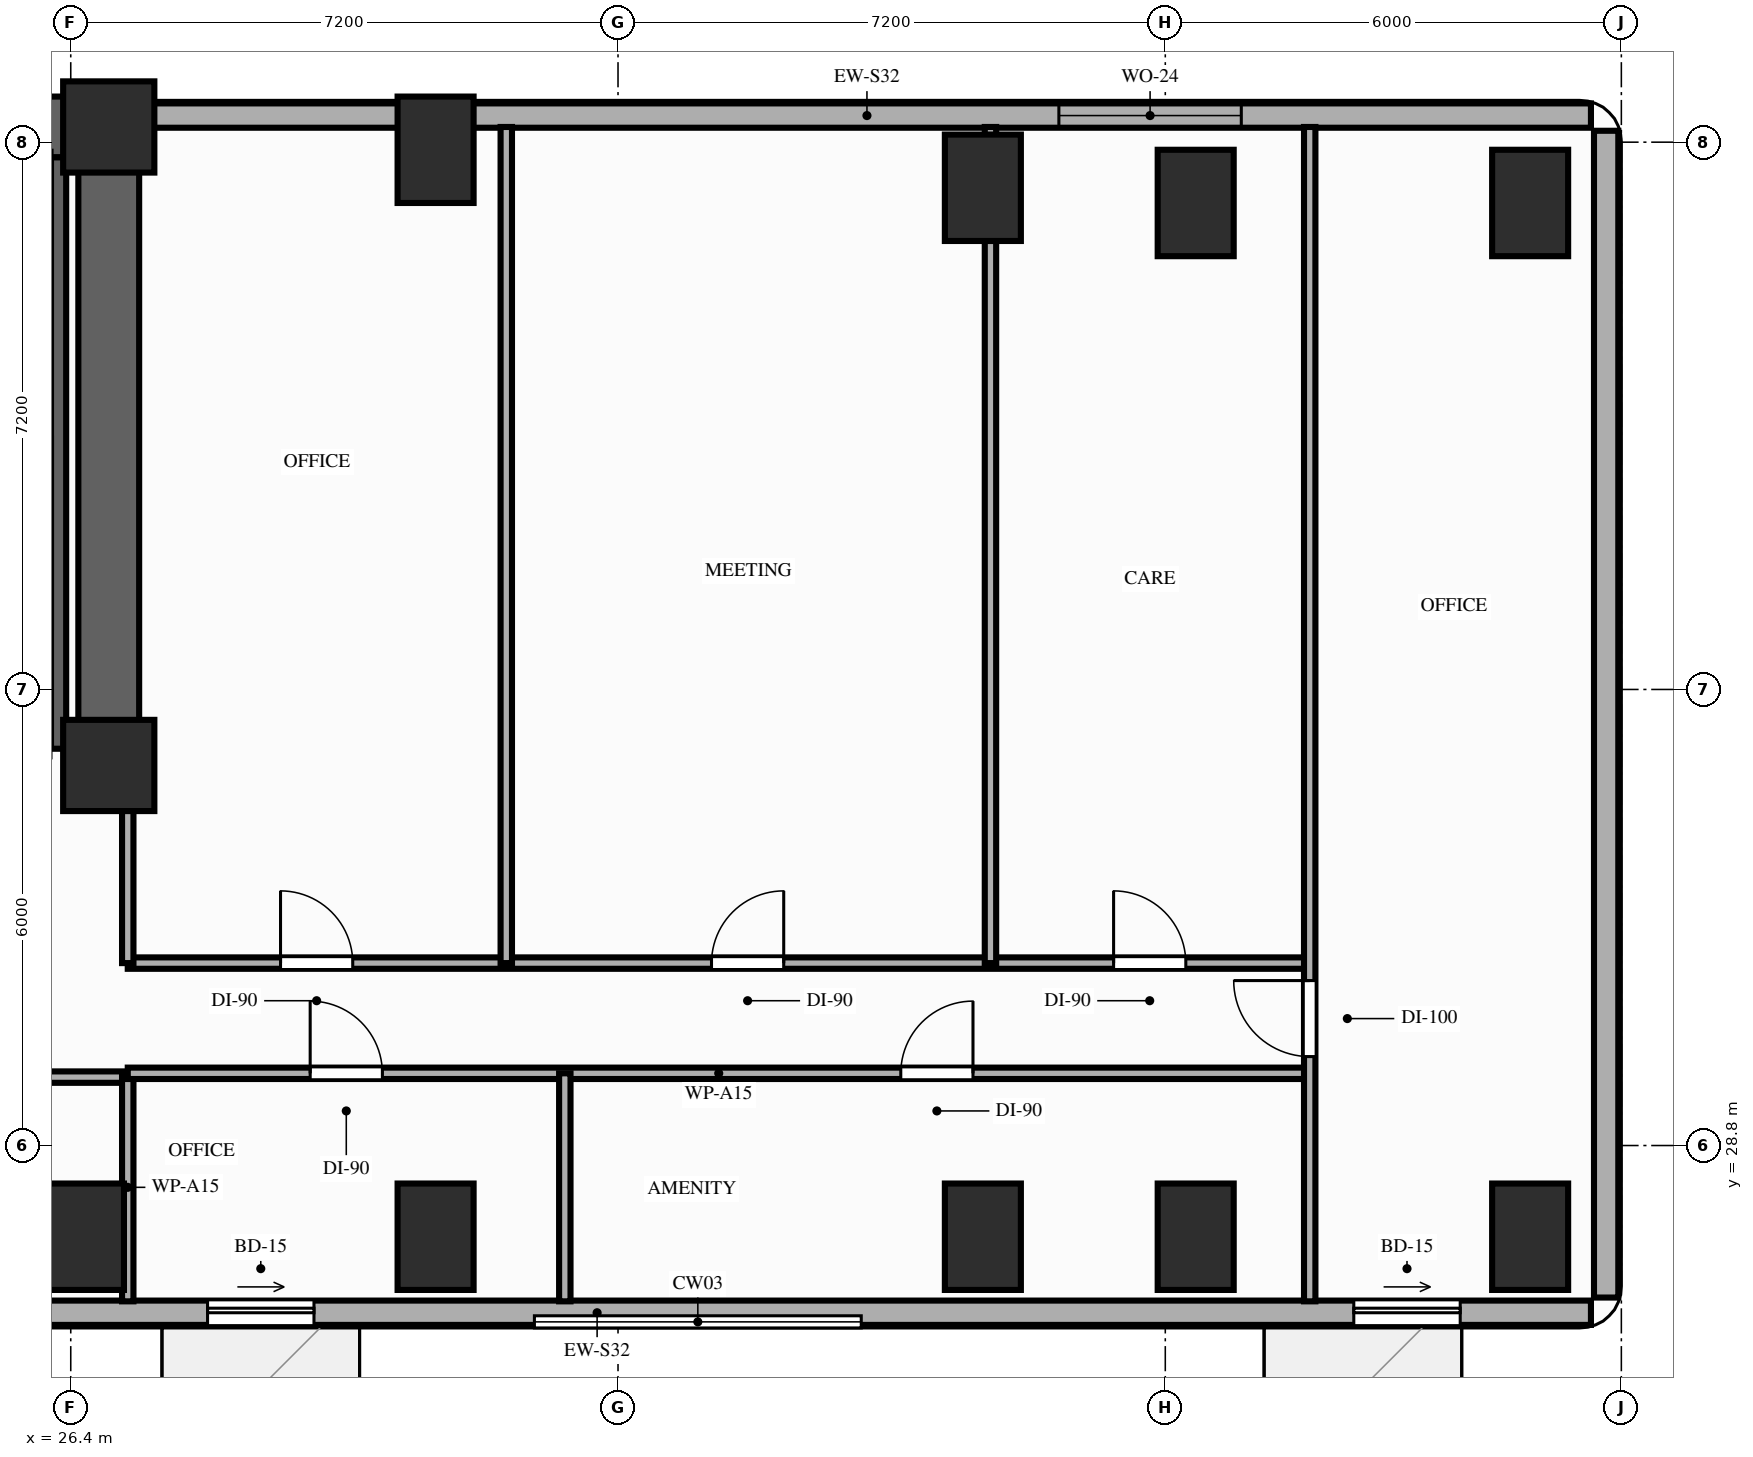
"""IFC4 building model, lengths in metres.
Left out: names, types, materials, properties, quantities, classifications, styles, units other than length and angle.
Written with IfcOpenShell. Run it as: python <this file> out.ifc"""

import sys

from ifc_helpers import new_model, si_unit, direction, frame, frame_2d, origin, origin_2d, place, context, subcontext, project, spatial, rectangle, extrude, element, fill, save


model = new_model("IFC4")
c1 = context("Model", 3, precision=1e-05, world=origin(), true_north=direction((0.0, 1.0)))
c2 = subcontext(c1, "Body", "Model", "MODEL_VIEW")
j1 = project(units=[si_unit("LENGTHUNIT", "METRE"), si_unit("PLANEANGLEUNIT", "RADIAN")], contexts=[c1])
p1 = place(None, origin())
s1 = spatial("IfcSite", under=j1, at=p1, CompositionType="ELEMENT")
p2 = place(p1, origin())
s2 = spatial("IfcBuilding", under=s1, at=p2, CompositionType="ELEMENT")
p3 = place(p2, frame((0.0, 0.0, 46.8)))
s3 = spatial("IfcBuildingStorey", under=s2, at=p3, CompositionType="ELEMENT", Elevation=46.8)
for number, where, z_axis, x_axis in (
    (1, (26.9, 33.8, 0.0), (0.0, 0.0, 1.0), (1.0, 0.0, 0.0)),
    (2, (26.9, 42.2, 0.0), (0.0, 0.0, 1.0), (1.0, 0.0, 0.0)),
):
    element("IfcColumn", number, at=place(p3, frame(where, z_axis=z_axis, x_axis=x_axis)), inside=s3, PredefinedType="COLUMN", context=c2, shape_type="SweptSolid", body=[
        extrude(rectangle(XDim=1.2, YDim=1.2, at=origin_2d()), origin(), (0.0, 0.0, 1.0), 3.2),
    ])
for number, where, z_axis, x_axis in (
    (3, (26.6, 27.6, 0.0), (0.0, 0.0, 1.0), (1.0, 0.0, 0.0)),
    (4, (31.2, 27.6, 0.0), (0.0, 0.0, 1.0), (1.0, 0.0, 0.0)),
    (5, (31.2, 41.9, 0.0), (0.0, 0.0, 1.0), (1.0, 0.0, 0.0)),
    (6, (38.4, 27.6, 0.0), (0.0, 0.0, 1.0), (1.0, 0.0, 0.0)),
    (7, (38.4, 41.4, 0.0), (0.0, 0.0, 1.0), (1.0, 0.0, 0.0)),
    (8, (41.2, 27.6, 0.0), (0.0, 0.0, 1.0), (1.0, 0.0, 0.0)),
    (9, (41.2, 41.2, 0.0), (0.0, 0.0, 1.0), (1.0, 0.0, 0.0)),
    (10, (45.6, 27.6, 0.0), (0.0, 0.0, 1.0), (1.0, 0.0, 0.0)),
    (11, (45.6, 41.2, 0.0), (0.0, 0.0, 1.0), (1.0, 0.0, 0.0)),
):
    element("IfcColumn", number, at=place(p3, frame(where, z_axis=z_axis, x_axis=x_axis)), inside=s3, PredefinedType="COLUMN", context=c2, shape_type="SweptSolid", body=[
        extrude(rectangle(XDim=1.0, YDim=1.4, at=origin_2d()), origin(), (0.0, 0.0, 1.0), 3.2),
    ])
p4 = place(p3, frame((46.4, 42.35, 0.0), z_axis=(0.0, 0.0, 1.0), x_axis=(-1.0, 0.0, 0.0)))
e12 = element("IfcWall", 12, at=p4, inside=s3, PredefinedType="STANDARD", context=c2, shape_type="SweptSolid", body=[
    extrude(rectangle(XDim=19.05, YDim=0.32, at=frame_2d((9.525, 0.0))), origin(), (0.0, 0.0, 1.0), 2.41),
])
p5 = place(p4, frame((4.6, 0.0, 0.85)))
e13 = element("IfcOpeningElement", 13, at=p5, cuts=e12, PredefinedType="OPENING", context=c2, shape_type="SweptSolid", body=[
    extrude(rectangle(XDim=2.4, YDim=1.31, at=frame_2d((1.2, 0.655))), frame((0.0, 0.17, 0.0), z_axis=(0.0, -1.0, 0.0), x_axis=(1.0, 0.0, 0.0)), (0.0, 0.0, 1.0), 0.34),
])
p6 = place(p3, frame((20.25, 26.6, 0.0), z_axis=(0.0, 0.0, 1.0), x_axis=(1.0, 0.0, 0.0)))
e14 = element("IfcWall", 14, at=p6, inside=s3, PredefinedType="STANDARD", context=c2, shape_type="SweptSolid", body=[
    extrude(rectangle(XDim=26.15, YDim=0.32, at=frame_2d((13.075, 0.0))), origin(), (0.0, 0.0, 1.0), 3.02),
])
p7 = place(p6, frame((7.95, 0.0, 0.0)))
e15 = element("IfcOpeningElement", 15, at=p7, cuts=e14, PredefinedType="OPENING", context=c2, shape_type="SweptSolid", body=[
    extrude(rectangle(XDim=1.4, YDim=2.1, at=frame_2d((0.7, 1.05))), frame((0.0, 0.17, 0.0), z_axis=(0.0, -1.0, 0.0), x_axis=(1.0, 0.0, 0.0)), (0.0, 0.0, 1.0), 0.34),
])
p8 = place(p6, frame((23.03, 0.0, 0.0)))
e16 = element("IfcOpeningElement", 16, at=p8, cuts=e14, PredefinedType="OPENING", context=c2, shape_type="SweptSolid", body=[
    extrude(rectangle(XDim=1.4, YDim=2.1, at=frame_2d((0.7, 1.05))), frame((0.0, 0.17, 0.0), z_axis=(0.0, -1.0, 0.0), x_axis=(1.0, 0.0, 0.0)), (0.0, 0.0, 1.0), 0.34),
])
p9 = place(p6, frame((1.95, 0.0, 0.85)))
e17 = element("IfcOpeningElement", 17, at=p9, cuts=e14, PredefinedType="OPENING", context=c2, shape_type="SweptSolid", body=[
    extrude(rectangle(XDim=2.4, YDim=1.8, at=frame_2d((1.2, 0.9))), frame((0.0, 0.17, 0.0), z_axis=(0.0, -1.0, 0.0), x_axis=(1.0, 0.0, 0.0)), (0.0, 0.0, 1.0), 0.34),
])
p10 = place(p3, frame((46.6, 26.8, 0.0), z_axis=(0.0, 0.0, 1.0), x_axis=(0.0, 1.0, 0.0)))
e18 = element("IfcWall", 18, at=p10, inside=s3, PredefinedType="STANDARD", context=c2, shape_type="SweptSolid", body=[
    extrude(rectangle(XDim=15.35, YDim=0.32, at=frame_2d((7.675, 0.0))), origin(), (0.0, 0.0, 1.0), 3.02),
])
p11 = place(p3, frame((6.45, 42.2, 0.0), z_axis=(0.0, 0.0, 1.0), x_axis=(1.0, 0.0, 0.0)))
e19 = element("IfcWall", 19, at=p11, inside=s3, PredefinedType="SHEAR", context=c2, shape_type="SweptSolid", body=[
    extrude(rectangle(XDim=20.45, YDim=0.8, at=frame_2d((10.225, 0.0))), origin(), (0.0, 0.0, 1.0), 3.02),
])
p12 = place(p3, frame((26.9, 33.8, 0.0), z_axis=(0.0, 0.0, 1.0), x_axis=(0.0, 1.0, 0.0)))
e20 = element("IfcWall", 20, at=p12, inside=s3, PredefinedType="SHEAR", context=c2, shape_type="SweptSolid", body=[
    extrude(rectangle(XDim=7.95, YDim=0.8, at=frame_2d((3.975, 0.0))), origin(), (0.0, 0.0, 1.0), 3.02),
])
p13 = place(p3, frame((26.24, 34.02, 0.0), z_axis=(0.0, 0.0, 1.0), x_axis=(0.0, 1.0, 0.0)))
e21 = element("IfcWall", 21, at=p13, inside=s3, PredefinedType="SHEAR", context=c2, shape_type="SweptSolid", body=[
    extrude(rectangle(XDim=7.78, YDim=0.2, at=frame_2d((3.89, 0.0))), origin(), (0.0, 0.0, 1.0), 3.02),
])
p14 = place(p3, frame((20.45, 29.7, 0.0), z_axis=(0.0, 0.0, 1.0), x_axis=(1.0, 0.0, 0.0)))
e22 = element("IfcWall", 22, at=p14, inside=s3, PredefinedType="PARTITIONING", context=c2, shape_type="SweptSolid", body=[
    extrude(rectangle(XDim=6.7, YDim=0.15, at=frame_2d((3.35, 0.0))), origin(), (0.0, 0.0, 1.0), 3.02),
])
p15 = place(p14, frame((2.8, 0.0, 0.0)))
e23 = element("IfcOpeningElement", 23, at=p15, cuts=e22, PredefinedType="OPENING", context=c2, shape_type="SweptSolid", body=[
    extrude(rectangle(XDim=0.95, YDim=2.15, at=frame_2d((0.475, 1.075))), frame((0.0, 0.085, 0.0), z_axis=(0.0, -1.0, 0.0), x_axis=(1.0, 0.0, 0.0)), (0.0, 0.0, 1.0), 0.17),
])
p16 = place(p3, frame((27.15, 26.75, 0.0), z_axis=(0.0, 0.0, 1.0), x_axis=(0.0, 1.0, 0.0)))
e24 = element("IfcWall", 24, at=p16, inside=s3, PredefinedType="PARTITIONING", context=c2, shape_type="SweptSolid", body=[
    extrude(rectangle(XDim=3.0, YDim=0.15, at=frame_2d((1.5, 0.0))), origin(), (0.0, 0.0, 1.0), 2.41),
])
p17 = place(p3, frame((27.15, 29.75, 0.0), z_axis=(0.0, 0.0, 1.0), x_axis=(1.0, 0.0, 0.0)))
e25 = element("IfcWall", 25, at=p17, inside=s3, PredefinedType="PARTITIONING", context=c2, shape_type="SweptSolid", body=[
    extrude(rectangle(XDim=15.55, YDim=0.15, at=frame_2d((7.775, 0.0))), origin(), (0.0, 0.0, 1.0), 2.41),
])
p18 = place(p17, frame((2.4, 0.0, 0.0)))
e26 = element("IfcOpeningElement", 26, at=p18, cuts=e25, PredefinedType="OPENING", context=c2, shape_type="SweptSolid", body=[
    extrude(rectangle(XDim=0.95, YDim=2.15, at=frame_2d((0.475, 1.075))), frame((0.0, 0.085, 0.0), z_axis=(0.0, -1.0, 0.0), x_axis=(1.0, 0.0, 0.0)), (0.0, 0.0, 1.0), 0.17),
])
p19 = place(p17, frame((10.17, 0.0, 0.0)))
e27 = element("IfcOpeningElement", 27, at=p19, cuts=e25, PredefinedType="OPENING", context=c2, shape_type="SweptSolid", body=[
    extrude(rectangle(XDim=0.95, YDim=2.15, at=frame_2d((0.475, 1.075))), frame((0.0, 0.085, 0.0), z_axis=(0.0, -1.0, 0.0), x_axis=(1.0, 0.0, 0.0)), (0.0, 0.0, 1.0), 0.17),
])
p20 = place(p3, frame((27.15, 31.2, 0.0), z_axis=(0.0, 0.0, 1.0), x_axis=(1.0, 0.0, 0.0)))
e28 = element("IfcWall", 28, at=p20, inside=s3, PredefinedType="PARTITIONING", context=c2, shape_type="SweptSolid", body=[
    extrude(rectangle(XDim=15.55, YDim=0.15, at=frame_2d((7.775, 0.0))), origin(), (0.0, 0.0, 1.0), 2.41),
])
p21 = place(p20, frame((2.01, 0.0, 0.0)))
e29 = element("IfcOpeningElement", 29, at=p21, cuts=e28, PredefinedType="OPENING", context=c2, shape_type="SweptSolid", body=[
    extrude(rectangle(XDim=0.95, YDim=2.15, at=frame_2d((0.475, 1.075))), frame((0.0, 0.085, 0.0), z_axis=(0.0, -1.0, 0.0), x_axis=(1.0, 0.0, 0.0)), (0.0, 0.0, 1.0), 0.17),
])
p22 = place(p20, frame((7.68, 0.0, 0.0)))
e30 = element("IfcOpeningElement", 30, at=p22, cuts=e28, PredefinedType="OPENING", context=c2, shape_type="SweptSolid", body=[
    extrude(rectangle(XDim=0.95, YDim=2.15, at=frame_2d((0.475, 1.075))), frame((0.0, 0.085, 0.0), z_axis=(0.0, -1.0, 0.0), x_axis=(1.0, 0.0, 0.0)), (0.0, 0.0, 1.0), 0.17),
])
p23 = place(p20, frame((12.97, 0.0, 0.0)))
e31 = element("IfcOpeningElement", 31, at=p23, cuts=e28, PredefinedType="OPENING", context=c2, shape_type="SweptSolid", body=[
    extrude(rectangle(XDim=0.95, YDim=2.15, at=frame_2d((0.475, 1.075))), frame((0.0, 0.085, 0.0), z_axis=(0.0, -1.0, 0.0), x_axis=(1.0, 0.0, 0.0)), (0.0, 0.0, 1.0), 0.17),
])
p24 = place(p3, frame((27.15, 31.2, 0.0), z_axis=(0.0, 0.0, 1.0), x_axis=(0.0, 1.0, 0.0)))
e32 = element("IfcWall", 32, at=p24, inside=s3, PredefinedType="PARTITIONING", context=c2, shape_type="SweptSolid", body=[
    extrude(rectangle(XDim=2.48, YDim=0.15, at=frame_2d((1.24, 0.0))), origin(), (0.0, 0.0, 1.0), 2.41),
])
p25 = place(p3, frame((42.7, 26.75, 0.0), z_axis=(0.0, 0.0, 1.0), x_axis=(0.0, 1.0, 0.0)))
e33 = element("IfcWall", 33, at=p25, inside=s3, PredefinedType="PARTITIONING", context=c2, shape_type="SweptSolid", body=[
    extrude(rectangle(XDim=15.45, YDim=0.15, at=frame_2d((7.725, 0.0))), origin(), (0.0, 0.0, 1.0), 2.41),
])
p26 = place(p25, frame((3.22, 0.0, 0.0)))
e34 = element("IfcOpeningElement", 34, at=p26, cuts=e33, PredefinedType="OPENING", context=c2, shape_type="SweptSolid", body=[
    extrude(rectangle(XDim=1.0, YDim=2.15, at=frame_2d((0.5, 1.075))), frame((0.0, 0.085, 0.0), z_axis=(0.0, -1.0, 0.0), x_axis=(1.0, 0.0, 0.0)), (0.0, 0.0, 1.0), 0.17),
])
p27 = place(p3, frame((32.9, 26.75, 0.0), z_axis=(0.0, 0.0, 1.0), x_axis=(0.0, 1.0, 0.0)))
e35 = element("IfcWall", 35, at=p27, inside=s3, PredefinedType="PARTITIONING", context=c2, shape_type="SweptSolid", body=[
    extrude(rectangle(XDim=3.0, YDim=0.15, at=frame_2d((1.5, 0.0))), origin(), (0.0, 0.0, 1.0), 2.41),
])
for number, where, z_axis, x_axis in (
    (36, (32.13, 31.2, 0.0), (0.0, 0.0, 1.0), (0.0, 1.0, 0.0)),
    (37, (38.5, 31.2, 0.0), (0.0, 0.0, 1.0), (0.0, 1.0, 0.0)),
):
    element("IfcWall", number, at=place(p3, frame(where, z_axis=z_axis, x_axis=x_axis)), inside=s3, PredefinedType="PARTITIONING", context=c2, shape_type="SweptSolid", body=[
        extrude(rectangle(XDim=11.0, YDim=0.15, at=frame_2d((5.5, 0.0))), origin(), (0.0, 0.0, 1.0), 2.41),
    ])
p28 = place(p7, origin())
e38 = element("IfcDoor", 38, at=p28, inside=s3, OperationType="SLIDING_TO_RIGHT", PredefinedType="DOOR", context=c2, shape_type="SweptSolid", body=[
    extrude(rectangle(XDim=1.4, YDim=2.1, at=frame_2d((0.7, 1.05))), frame((0.0, 0.025, 0.0), z_axis=(0.0, -1.0, 0.0), x_axis=(1.0, 0.0, 0.0)), (0.0, 0.0, 1.0), 0.05),
])
fill(e15, e38)
p29 = place(p8, origin())
e39 = element("IfcDoor", 39, at=p29, inside=s3, OperationType="SLIDING_TO_RIGHT", PredefinedType="DOOR", context=c2, shape_type="SweptSolid", body=[
    extrude(rectangle(XDim=1.4, YDim=2.1, at=frame_2d((0.7, 1.05))), frame((0.0, 0.025, 0.0), z_axis=(0.0, -1.0, 0.0), x_axis=(1.0, 0.0, 0.0)), (0.0, 0.0, 1.0), 0.05),
])
fill(e16, e39)
p30 = place(p5, origin())
e40 = element("IfcWindow", 40, at=p30, inside=s3, PartitioningType="SINGLE_PANEL", PredefinedType="WINDOW", context=c2, shape_type="SweptSolid", body=[
    extrude(rectangle(XDim=2.4, YDim=1.31, at=frame_2d((1.2, 0.655))), frame((0.0, 0.03, 0.0), z_axis=(0.0, -1.0, 0.0), x_axis=(1.0, 0.0, 0.0)), (0.0, 0.0, 1.0), 0.06),
])
fill(e13, e40)
p31 = place(p26, origin())
e41 = element("IfcDoor", 41, at=p31, inside=s3, OperationType="SINGLE_SWING_RIGHT", PredefinedType="DOOR", context=c2, shape_type="SweptSolid", body=[
    extrude(rectangle(XDim=1.0, YDim=2.15, at=frame_2d((0.5, 1.075))), frame((0.0, 0.025, 0.0), z_axis=(0.0, -1.0, 0.0), x_axis=(1.0, 0.0, 0.0)), (0.0, 0.0, 1.0), 0.05),
])
fill(e34, e41)
p32 = place(p18, origin())
e42 = element("IfcDoor", 42, at=p32, inside=s3, OperationType="SINGLE_SWING_LEFT", PredefinedType="DOOR", context=c2, shape_type="SweptSolid", body=[
    extrude(rectangle(XDim=0.95, YDim=2.15, at=frame_2d((0.475, 1.075))), frame((0.0, 0.025, 0.0), z_axis=(0.0, -1.0, 0.0), x_axis=(1.0, 0.0, 0.0)), (0.0, 0.0, 1.0), 0.05),
])
fill(e26, e42)
p33 = place(p19, origin())
e43 = element("IfcDoor", 43, at=p33, inside=s3, OperationType="SINGLE_SWING_RIGHT", PredefinedType="DOOR", context=c2, shape_type="SweptSolid", body=[
    extrude(rectangle(XDim=0.95, YDim=2.15, at=frame_2d((0.475, 1.075))), frame((0.0, 0.025, 0.0), z_axis=(0.0, -1.0, 0.0), x_axis=(1.0, 0.0, 0.0)), (0.0, 0.0, 1.0), 0.05),
])
fill(e27, e43)
p34 = place(p21, origin())
e44 = element("IfcDoor", 44, at=p34, inside=s3, OperationType="SINGLE_SWING_LEFT", PredefinedType="DOOR", context=c2, shape_type="SweptSolid", body=[
    extrude(rectangle(XDim=0.95, YDim=2.15, at=frame_2d((0.475, 1.075))), frame((0.0, 0.025, 0.0), z_axis=(0.0, -1.0, 0.0), x_axis=(1.0, 0.0, 0.0)), (0.0, 0.0, 1.0), 0.05),
])
fill(e29, e44)
p35 = place(p22, origin())
e45 = element("IfcDoor", 45, at=p35, inside=s3, OperationType="SINGLE_SWING_RIGHT", PredefinedType="DOOR", context=c2, shape_type="SweptSolid", body=[
    extrude(rectangle(XDim=0.95, YDim=2.15, at=frame_2d((0.475, 1.075))), frame((0.0, 0.025, 0.0), z_axis=(0.0, -1.0, 0.0), x_axis=(1.0, 0.0, 0.0)), (0.0, 0.0, 1.0), 0.05),
])
fill(e30, e45)
p36 = place(p23, origin())
e46 = element("IfcDoor", 46, at=p36, inside=s3, OperationType="SINGLE_SWING_LEFT", PredefinedType="DOOR", context=c2, shape_type="SweptSolid", body=[
    extrude(rectangle(XDim=0.95, YDim=2.15, at=frame_2d((0.475, 1.075))), frame((0.0, 0.025, 0.0), z_axis=(0.0, -1.0, 0.0), x_axis=(1.0, 0.0, 0.0)), (0.0, 0.0, 1.0), 0.05),
])
fill(e31, e46)
save(model, sys.argv[1])
